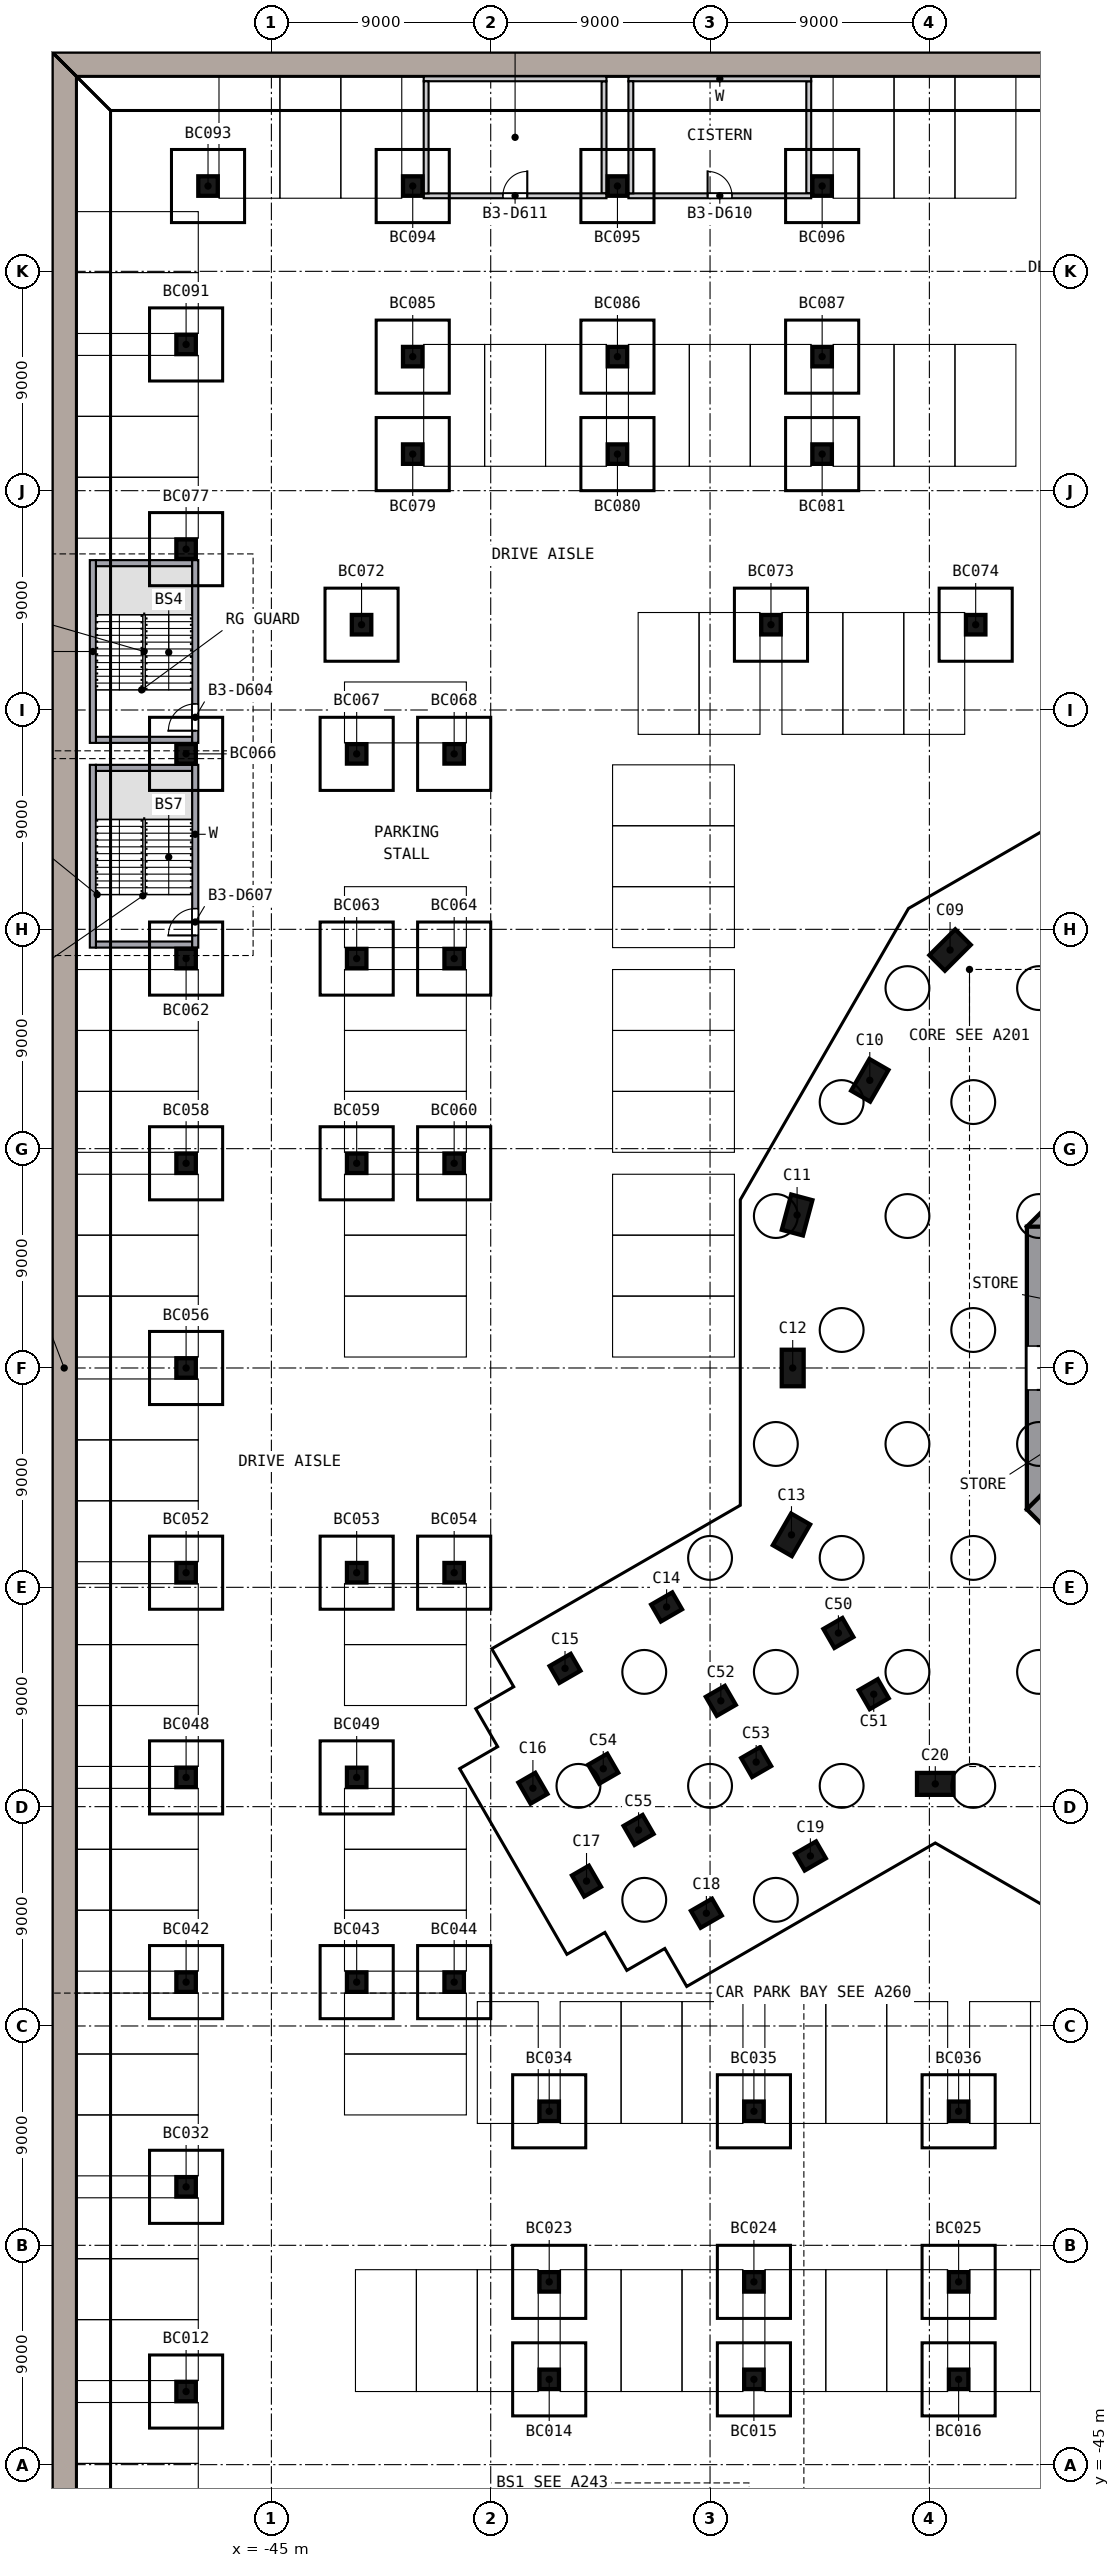
"""IFC4 building model, lengths in metres.
Left out: names, types, materials, properties, quantities, classifications, styles, units other than length and angle.
Written with IfcOpenShell. Run it as: python <this file> out.ifc"""

import sys

from ifc_helpers import new_model, si_unit, direction, frame, frame_2d, origin, origin_2d, place, context, subcontext, project, spatial, polyline, rectangle, outline, extrude, element, fill, save


model = new_model("IFC4")
c1 = context("Model", 3, precision=1e-05, world=origin(), true_north=direction((0.0, 1.0)))
c2 = subcontext(c1, "Body", "Model", "MODEL_VIEW")
j1 = project(units=[si_unit("LENGTHUNIT", "METRE"), si_unit("PLANEANGLEUNIT", "RADIAN")], contexts=[c1])
p1 = place(None, origin())
s1 = spatial("IfcSite", under=j1, at=p1, CompositionType="ELEMENT")
p2 = place(p1, origin())
s2 = spatial("IfcBuilding", under=s1, at=p2, CompositionType="ELEMENT")
p3 = place(p2, frame((0.0, 0.0, -11.7)))
s3 = spatial("IfcBuildingStorey", under=s2, at=p3, CompositionType="ELEMENT", Elevation=-11.7)
for number, where, z_axis, x_axis in (
    (1, (-17.151, 17.151, 0.0), (0.0, 0.0, 1.0), (0.707, 0.707, 0.0)),
    (2, (-20.445, 11.804, 0.0), (0.0, 0.0, 1.0), (-0.5, -0.866, 0.0)),
    (3, (-23.428, 6.278, 0.0), (0.0, 0.0, 1.0), (0.259, 0.966, 0.0)),
    (4, (-23.608, 0.0, 0.0), (0.0, 0.0, 1.0), (0.0, -1.0, 0.0)),
    (5, (-23.658, -6.846, 0.0), (0.0, 0.0, 1.0), (0.5, 0.866, 0.0)),
):
    element("IfcColumn", number, at=place(p3, frame(where, z_axis=z_axis, x_axis=x_axis)), inside=s3, PredefinedType="COLUMN", context=c2, shape_type="SweptSolid", body=[
        extrude(rectangle(XDim=1.5, YDim=0.9, at=origin_2d()), origin(), (0.0, 0.0, 1.0), 3.45),
    ])
for number, where, z_axis, x_axis in (
    (6, (-28.783, -9.805, 0.0), (0.0, 0.0, 1.0), (-0.866, -0.5, 0.0)),
    (7, (-32.951, -12.327, 0.0), (0.0, 0.0, 1.0), (-0.866, -0.5, 0.0)),
    (8, (-34.269, -17.245, 0.0), (0.0, 0.0, 1.0), (0.5, -0.866, 0.0)),
    (9, (-32.069, -21.055, 0.0), (0.0, 0.0, 1.0), (0.5, -0.866, 0.0)),
    (10, (-27.151, -22.373, 0.0), (0.0, 0.0, 1.0), (0.866, 0.5, 0.0)),
    (11, (-22.883, -20.024, 0.0), (0.0, 0.0, 1.0), (0.866, 0.5, 0.0)),
):
    element("IfcColumn", number, at=place(p3, frame(where, z_axis=z_axis, x_axis=x_axis)), inside=s3, PredefinedType="COLUMN", context=c2, shape_type="SweptSolid", body=[
        extrude(rectangle(XDim=1.0, YDim=0.8, at=origin_2d()), origin(), (0.0, 0.0, 1.0), 3.45),
    ])
p4 = place(p3, frame((-17.758, -17.065, 0.0), z_axis=(0.0, 0.0, 1.0), x_axis=(-1.0, 0.0, 0.0)))
e12 = element("IfcColumn", 12, at=p4, inside=s3, PredefinedType="COLUMN", context=c2, shape_type="SweptSolid", body=[
    extrude(rectangle(XDim=1.5, YDim=0.9, at=origin_2d()), origin(), (0.0, 0.0, 1.0), 3.45),
])
for number, where, z_axis, x_axis in (
    (13, (-21.733, -10.873, 0.0), (0.0, 0.0, 1.0), (-0.866, -0.5, 0.0)),
    (14, (-20.283, -13.385, 0.0), (0.0, 0.0, 1.0), (-0.866, -0.5, 0.0)),
    (15, (-26.558, -13.659, 0.0), (0.0, 0.0, 1.0), (-0.866, -0.5, 0.0)),
    (16, (-25.108, -16.17, 0.0), (0.0, 0.0, 1.0), (-0.866, -0.5, 0.0)),
    (17, (-31.382, -16.444, 0.0), (0.0, 0.0, 1.0), (-0.866, -0.5, 0.0)),
    (18, (-29.932, -18.956, 0.0), (0.0, 0.0, 1.0), (-0.866, -0.5, 0.0)),
):
    element("IfcColumn", number, at=place(p3, frame(where, z_axis=z_axis, x_axis=x_axis)), inside=s3, PredefinedType="COLUMN", context=c2, shape_type="SweptSolid", body=[
        extrude(rectangle(XDim=0.9, YDim=0.9, at=origin_2d()), origin(), (0.0, 0.0, 1.0), 3.45),
    ])
p5 = place(p3, frame((-5.481, 13.682, 0.0), z_axis=(0.0, 0.0, 1.0), x_axis=(-0.707106781, -0.707106781, 0.0)))
e19 = element("IfcWall", 19, at=p5, inside=s3, PredefinedType="SHEAR", context=c2, shape_type="SweptSolid", body=[
    extrude(rectangle(XDim=11.598, YDim=0.9, at=frame_2d((5.799, 0.0))), origin(), (0.0, 0.0, 1.0), 3.9),
])
p6 = place(p3, frame((-13.55, 5.799, 0.0), z_axis=(0.0, 0.0, 1.0), x_axis=(0.0, -1.0, 0.0)))
e20 = element("IfcWall", 20, at=p6, inside=s3, PredefinedType="SHEAR", context=c2, shape_type="SweptSolid", body=[
    extrude(rectangle(XDim=11.598, YDim=0.9, at=frame_2d((5.799, 0.0))), origin(), (0.0, 0.0, 1.0), 3.9),
])
p7 = place(p6, frame((4.899, 0.0, 0.0)))
e21 = element("IfcOpeningElement", 21, at=p7, cuts=e20, PredefinedType="OPENING", context=c2, shape_type="SweptSolid", body=[
    extrude(rectangle(XDim=1.8, YDim=2.1, at=frame_2d((0.9, 1.05))), frame((0.0, 0.46, 0.0), z_axis=(0.0, -1.0, 0.0), x_axis=(1.0, 0.0, 0.0)), (0.0, 0.0, 1.0), 0.92),
])
p8 = place(p3, frame((-13.682, -5.481, 0.0), z_axis=(0.0, 0.0, 1.0), x_axis=(0.707106781, -0.707106781, 0.0)))
e22 = element("IfcWall", 22, at=p8, inside=s3, PredefinedType="SHEAR", context=c2, shape_type="SweptSolid", body=[
    extrude(rectangle(XDim=11.598, YDim=0.9, at=frame_2d((5.799, 0.0))), origin(), (0.0, 0.0, 1.0), 3.9),
])
p9 = place(p3, frame((0.0, 0.0, -0.8)))
e23 = element("IfcWall", 23, at=p9, inside=s3, PredefinedType="SOLIDWALL", context=c2, shape_type="SweptSolid", body=[
    extrude(outline(polyline([(54.0, 54.0), (-54.0, 54.0), (-53.0, 53.0), (53.0, 53.0), (54.0, 54.0)])), origin(), (0.0, 0.0, 1.0), 4.7),
])
p10 = place(p3, frame((0.0, 0.0, -0.8)))
e24 = element("IfcWall", 24, at=p10, inside=s3, PredefinedType="SOLIDWALL", context=c2, shape_type="SweptSolid", body=[
    extrude(outline(polyline([(-54.0, 54.0), (-54.0, -54.0), (-53.0, -53.0), (-53.0, 53.0), (-54.0, 54.0)])), origin(), (0.0, 0.0, 1.0), 4.7),
])
for number, where, z_axis, x_axis in (
    (25, (-48.5, -42.0, -0.8), (0.0, 0.0, 1.0), (1.0, 0.0, 0.0)),
    (26, (-33.6, -41.5, -0.8), (0.0, 0.0, 1.0), (1.0, 0.0, 0.0)),
    (27, (-25.2, -41.5, -0.8), (0.0, 0.0, 1.0), (1.0, 0.0, 0.0)),
    (28, (-16.8, -41.5, -0.8), (0.0, 0.0, 1.0), (1.0, 0.0, 0.0)),
    (29, (-33.6, -37.5, -0.8), (0.0, 0.0, 1.0), (1.0, 0.0, 0.0)),
    (30, (-25.2, -37.5, -0.8), (0.0, 0.0, 1.0), (1.0, 0.0, 0.0)),
    (31, (-16.8, -37.5, -0.8), (0.0, 0.0, 1.0), (1.0, 0.0, 0.0)),
    (32, (-48.5, -33.6, -0.8), (0.0, 0.0, 1.0), (1.0, 0.0, 0.0)),
    (33, (-33.6, -30.5, -0.8), (0.0, 0.0, 1.0), (1.0, 0.0, 0.0)),
    (34, (-25.2, -30.5, -0.8), (0.0, 0.0, 1.0), (1.0, 0.0, 0.0)),
    (35, (-16.8, -30.5, -0.8), (0.0, 0.0, 1.0), (1.0, 0.0, 0.0)),
    (36, (-48.5, -25.2, -0.8), (0.0, 0.0, 1.0), (1.0, 0.0, 0.0)),
    (37, (-41.5, -25.2, -0.8), (0.0, 0.0, 1.0), (1.0, 0.0, 0.0)),
    (38, (-37.5, -25.2, -0.8), (0.0, 0.0, 1.0), (1.0, 0.0, 0.0)),
    (39, (-48.5, -16.8, -0.8), (0.0, 0.0, 1.0), (1.0, 0.0, 0.0)),
    (40, (-41.5, -16.8, -0.8), (0.0, 0.0, 1.0), (1.0, 0.0, 0.0)),
    (41, (-48.5, -8.4, -0.8), (0.0, 0.0, 1.0), (1.0, 0.0, 0.0)),
    (42, (-41.5, -8.4, -0.8), (0.0, 0.0, 1.0), (1.0, 0.0, 0.0)),
    (43, (-37.5, -8.4, -0.8), (0.0, 0.0, 1.0), (1.0, 0.0, 0.0)),
    (44, (-48.5, 0.0, -0.8), (0.0, 0.0, 1.0), (1.0, 0.0, 0.0)),
    (45, (-48.5, 8.4, -0.8), (0.0, 0.0, 1.0), (1.0, 0.0, 0.0)),
    (46, (-41.5, 8.4, -0.8), (0.0, 0.0, 1.0), (1.0, 0.0, 0.0)),
    (47, (-37.5, 8.4, -0.8), (0.0, 0.0, 1.0), (1.0, 0.0, 0.0)),
    (48, (-48.5, 16.8, -0.8), (0.0, 0.0, 1.0), (1.0, 0.0, 0.0)),
    (49, (-41.5, 16.8, -0.8), (0.0, 0.0, 1.0), (1.0, 0.0, 0.0)),
    (50, (-37.5, 16.8, -0.8), (0.0, 0.0, 1.0), (1.0, 0.0, 0.0)),
    (51, (-48.5, 25.2, -0.8), (0.0, 0.0, 1.0), (1.0, 0.0, 0.0)),
    (52, (-41.5, 25.2, -0.8), (0.0, 0.0, 1.0), (1.0, 0.0, 0.0)),
    (53, (-37.5, 25.2, -0.8), (0.0, 0.0, 1.0), (1.0, 0.0, 0.0)),
    (54, (-41.3, 30.5, -0.8), (0.0, 0.0, 1.0), (1.0, 0.0, 0.0)),
    (55, (-24.5, 30.5, -0.8), (0.0, 0.0, 1.0), (1.0, 0.0, 0.0)),
    (56, (-16.1, 30.5, -0.8), (0.0, 0.0, 1.0), (1.0, 0.0, 0.0)),
    (57, (-48.5, 33.6, -0.8), (0.0, 0.0, 1.0), (1.0, 0.0, 0.0)),
    (58, (-39.2, 37.5, -0.8), (0.0, 0.0, 1.0), (1.0, 0.0, 0.0)),
    (59, (-30.8, 37.5, -0.8), (0.0, 0.0, 1.0), (1.0, 0.0, 0.0)),
    (60, (-22.4, 37.5, -0.8), (0.0, 0.0, 1.0), (1.0, 0.0, 0.0)),
    (61, (-39.2, 41.5, -0.8), (0.0, 0.0, 1.0), (1.0, 0.0, 0.0)),
    (62, (-30.8, 41.5, -0.8), (0.0, 0.0, 1.0), (1.0, 0.0, 0.0)),
    (63, (-22.4, 41.5, -0.8), (0.0, 0.0, 1.0), (1.0, 0.0, 0.0)),
    (64, (-48.5, 42.0, -0.8), (0.0, 0.0, 1.0), (1.0, 0.0, 0.0)),
    (65, (-47.6, 48.5, -0.8), (0.0, 0.0, 1.0), (1.0, 0.0, 0.0)),
    (66, (-39.2, 48.5, -0.8), (0.0, 0.0, 1.0), (1.0, 0.0, 0.0)),
    (67, (-30.8, 48.5, -0.8), (0.0, 0.0, 1.0), (1.0, 0.0, 0.0)),
    (68, (-22.4, 48.5, -0.8), (0.0, 0.0, 1.0), (1.0, 0.0, 0.0)),
):
    element("IfcColumn", number, at=place(p3, frame(where, z_axis=z_axis, x_axis=x_axis)), inside=s3, PredefinedType="COLUMN", context=c2, shape_type="SweptSolid", body=[
        extrude(rectangle(XDim=0.8, YDim=0.8, at=origin_2d()), origin(), (0.0, 0.0, 1.0), 4.7),
    ])
p11 = place(p3, frame((-52.325, 25.65, 0.0), z_axis=(0.0, 0.0, 1.0), x_axis=(0.0, 1.0, 0.0)))
e69 = element("IfcWall", 69, at=p11, inside=s3, PredefinedType="SOLIDWALL", context=c2, shape_type="SweptSolid", body=[
    extrude(rectangle(XDim=7.5, YDim=0.25, at=frame_2d((3.75, 0.0))), origin(), (0.0, 0.0, 1.0), 3.9),
])
p12 = place(p3, frame((-48.125, 25.65, 0.0), z_axis=(0.0, 0.0, 1.0), x_axis=(0.0, 1.0, 0.0)))
e70 = element("IfcWall", 70, at=p12, inside=s3, PredefinedType="SOLIDWALL", context=c2, shape_type="SweptSolid", body=[
    extrude(rectangle(XDim=7.5, YDim=0.25, at=frame_2d((3.75, 0.0))), origin(), (0.0, 0.0, 1.0), 3.9),
])
p13 = place(p12, frame((0.5, 0.0, 0.0)))
e71 = element("IfcOpeningElement", 71, at=p13, cuts=e70, PredefinedType="OPENING", context=c2, shape_type="SweptSolid", body=[
    extrude(rectangle(XDim=1.1, YDim=2.1, at=frame_2d((0.55, 1.05))), frame((0.0, 0.135, 0.0), z_axis=(0.0, -1.0, 0.0), x_axis=(1.0, 0.0, 0.0)), (0.0, 0.0, 1.0), 0.27),
])
for number, where, z_axis, x_axis in (
    (72, (-48.25, 25.775, 0.0), (0.0, 0.0, 1.0), (-1.0, 0.0, 0.0)),
    (73, (-48.25, 33.025, 0.0), (0.0, 0.0, 1.0), (-1.0, 0.0, 0.0)),
):
    element("IfcWall", number, at=place(p3, frame(where, z_axis=z_axis, x_axis=x_axis)), inside=s3, PredefinedType="SOLIDWALL", context=c2, shape_type="SweptSolid", body=[
        extrude(rectangle(XDim=3.95, YDim=0.25, at=frame_2d((1.975, 0.0))), origin(), (0.0, 0.0, 1.0), 3.9),
    ])
p14 = place(p3, frame((-52.325, 17.25, 0.0), z_axis=(0.0, 0.0, 1.0), x_axis=(0.0, 1.0, 0.0)))
e74 = element("IfcWall", 74, at=p14, inside=s3, PredefinedType="SOLIDWALL", context=c2, shape_type="SweptSolid", body=[
    extrude(rectangle(XDim=7.5, YDim=0.25, at=frame_2d((3.75, 0.0))), origin(), (0.0, 0.0, 1.0), 3.9),
])
p15 = place(p3, frame((-48.125, 17.25, 0.0), z_axis=(0.0, 0.0, 1.0), x_axis=(0.0, 1.0, 0.0)))
e75 = element("IfcWall", 75, at=p15, inside=s3, PredefinedType="SOLIDWALL", context=c2, shape_type="SweptSolid", body=[
    extrude(rectangle(XDim=7.5, YDim=0.25, at=frame_2d((3.75, 0.0))), origin(), (0.0, 0.0, 1.0), 3.9),
])
p16 = place(p15, frame((0.5, 0.0, 0.0)))
e76 = element("IfcOpeningElement", 76, at=p16, cuts=e75, PredefinedType="OPENING", context=c2, shape_type="SweptSolid", body=[
    extrude(rectangle(XDim=1.1, YDim=2.1, at=frame_2d((0.55, 1.05))), frame((0.0, 0.135, 0.0), z_axis=(0.0, -1.0, 0.0), x_axis=(1.0, 0.0, 0.0)), (0.0, 0.0, 1.0), 0.27),
])
for number, where, z_axis, x_axis in (
    (77, (-48.25, 17.375, 0.0), (0.0, 0.0, 1.0), (-1.0, 0.0, 0.0)),
    (78, (-48.25, 24.625, 0.0), (0.0, 0.0, 1.0), (-1.0, 0.0, 0.0)),
):
    element("IfcWall", number, at=place(p3, frame(where, z_axis=z_axis, x_axis=x_axis)), inside=s3, PredefinedType="SOLIDWALL", context=c2, shape_type="SweptSolid", body=[
        extrude(rectangle(XDim=3.95, YDim=0.25, at=frame_2d((1.975, 0.0))), origin(), (0.0, 0.0, 1.0), 3.9),
    ])
p17 = place(p3, frame((-30.35, 48.1, 0.0), z_axis=(0.0, 0.0, 1.0), x_axis=(1.0, 0.0, 0.0)))
e79 = element("IfcWall", 79, at=p17, inside=s3, PredefinedType="PARTITIONING", context=c2, shape_type="SweptSolid", body=[
    extrude(rectangle(XDim=7.5, YDim=0.2, at=frame_2d((3.75, 0.0))), origin(), (0.0, 0.0, 1.0), 3.45),
])
p18 = place(p17, frame((3.25, 0.0, 0.0)))
e80 = element("IfcOpeningElement", 80, at=p18, cuts=e79, PredefinedType="OPENING", context=c2, shape_type="SweptSolid", body=[
    extrude(rectangle(XDim=1.0, YDim=2.1, at=frame_2d((0.5, 1.05))), frame((0.0, 0.11, 0.0), z_axis=(0.0, -1.0, 0.0), x_axis=(1.0, 0.0, 0.0)), (0.0, 0.0, 1.0), 0.22),
])
p19 = place(p3, frame((-30.35, 52.9, 0.0), z_axis=(0.0, 0.0, 1.0), x_axis=(1.0, 0.0, 0.0)))
e81 = element("IfcWall", 81, at=p19, inside=s3, PredefinedType="PARTITIONING", context=c2, shape_type="SweptSolid", body=[
    extrude(rectangle(XDim=7.5, YDim=0.2, at=frame_2d((3.75, 0.0))), origin(), (0.0, 0.0, 1.0), 3.45),
])
for number, where, z_axis, x_axis in (
    (82, (-30.25, 48.2, 0.0), (0.0, 0.0, 1.0), (0.0, 1.0, 0.0)),
    (83, (-22.95, 48.2, 0.0), (0.0, 0.0, 1.0), (0.0, 1.0, 0.0)),
):
    element("IfcWall", number, at=place(p3, frame(where, z_axis=z_axis, x_axis=x_axis)), inside=s3, PredefinedType="PARTITIONING", context=c2, shape_type="SweptSolid", body=[
        extrude(rectangle(XDim=4.6, YDim=0.2, at=frame_2d((2.3, 0.0))), origin(), (0.0, 0.0, 1.0), 3.45),
    ])
p20 = place(p3, frame((-38.75, 48.1, 0.0), z_axis=(0.0, 0.0, 1.0), x_axis=(1.0, 0.0, 0.0)))
e84 = element("IfcWall", 84, at=p20, inside=s3, PredefinedType="PARTITIONING", context=c2, shape_type="SweptSolid", body=[
    extrude(rectangle(XDim=7.5, YDim=0.2, at=frame_2d((3.75, 0.0))), origin(), (0.0, 0.0, 1.0), 3.45),
])
p21 = place(p20, frame((3.25, 0.0, 0.0)))
e85 = element("IfcOpeningElement", 85, at=p21, cuts=e84, PredefinedType="OPENING", context=c2, shape_type="SweptSolid", body=[
    extrude(rectangle(XDim=1.0, YDim=2.1, at=frame_2d((0.5, 1.05))), frame((0.0, 0.11, 0.0), z_axis=(0.0, -1.0, 0.0), x_axis=(1.0, 0.0, 0.0)), (0.0, 0.0, 1.0), 0.22),
])
p22 = place(p3, frame((-38.75, 52.9, 0.0), z_axis=(0.0, 0.0, 1.0), x_axis=(1.0, 0.0, 0.0)))
e86 = element("IfcWall", 86, at=p22, inside=s3, PredefinedType="PARTITIONING", context=c2, shape_type="SweptSolid", body=[
    extrude(rectangle(XDim=7.5, YDim=0.2, at=frame_2d((3.75, 0.0))), origin(), (0.0, 0.0, 1.0), 3.45),
])
for number, where, z_axis, x_axis in (
    (87, (-38.65, 48.2, 0.0), (0.0, 0.0, 1.0), (0.0, 1.0, 0.0)),
    (88, (-31.35, 48.2, 0.0), (0.0, 0.0, 1.0), (0.0, 1.0, 0.0)),
):
    element("IfcWall", number, at=place(p3, frame(where, z_axis=z_axis, x_axis=x_axis)), inside=s3, PredefinedType="PARTITIONING", context=c2, shape_type="SweptSolid", body=[
        extrude(rectangle(XDim=4.6, YDim=0.2, at=frame_2d((2.3, 0.0))), origin(), (0.0, 0.0, 1.0), 3.45),
    ])
p23 = place(p7, origin())
e89 = element("IfcDoor", 89, at=p23, inside=s3, OperationType="DOUBLE_DOOR_SINGLE_SWING", PredefinedType="DOOR", context=c2, shape_type="SweptSolid", body=[
    extrude(rectangle(XDim=1.8, YDim=2.1, at=frame_2d((0.9, 1.05))), frame((0.0, 0.025, 0.0), z_axis=(0.0, -1.0, 0.0), x_axis=(1.0, 0.0, 0.0)), (0.0, 0.0, 1.0), 0.05),
])
fill(e21, e89)
p24 = place(p13, origin())
e90 = element("IfcDoor", 90, at=p24, inside=s3, OperationType="SINGLE_SWING_LEFT", PredefinedType="DOOR", context=c2, shape_type="SweptSolid", body=[
    extrude(rectangle(XDim=1.1, YDim=2.1, at=frame_2d((0.55, 1.05))), frame((0.0, 0.025, 0.0), z_axis=(0.0, -1.0, 0.0), x_axis=(1.0, 0.0, 0.0)), (0.0, 0.0, 1.0), 0.05),
])
fill(e71, e90)
p25 = place(p16, origin())
e91 = element("IfcDoor", 91, at=p25, inside=s3, OperationType="SINGLE_SWING_LEFT", PredefinedType="DOOR", context=c2, shape_type="SweptSolid", body=[
    extrude(rectangle(XDim=1.1, YDim=2.1, at=frame_2d((0.55, 1.05))), frame((0.0, 0.025, 0.0), z_axis=(0.0, -1.0, 0.0), x_axis=(1.0, 0.0, 0.0)), (0.0, 0.0, 1.0), 0.05),
])
fill(e76, e91)
p26 = place(p18, origin())
e92 = element("IfcDoor", 92, at=p26, inside=s3, OperationType="SINGLE_SWING_LEFT", PredefinedType="DOOR", context=c2, shape_type="SweptSolid", body=[
    extrude(rectangle(XDim=1.0, YDim=2.1, at=frame_2d((0.5, 1.05))), frame((0.0, 0.025, 0.0), z_axis=(0.0, -1.0, 0.0), x_axis=(1.0, 0.0, 0.0)), (0.0, 0.0, 1.0), 0.05),
])
fill(e80, e92)
p27 = place(p21, origin())
e93 = element("IfcDoor", 93, at=p27, inside=s3, OperationType="SINGLE_SWING_RIGHT", PredefinedType="DOOR", context=c2, shape_type="SweptSolid", body=[
    extrude(rectangle(XDim=1.0, YDim=2.1, at=frame_2d((0.5, 1.05))), frame((0.0, 0.025, 0.0), z_axis=(0.0, -1.0, 0.0), x_axis=(1.0, 0.0, 0.0)), (0.0, 0.0, 1.0), 0.05),
])
fill(e85, e93)
save(model, sys.argv[1])
